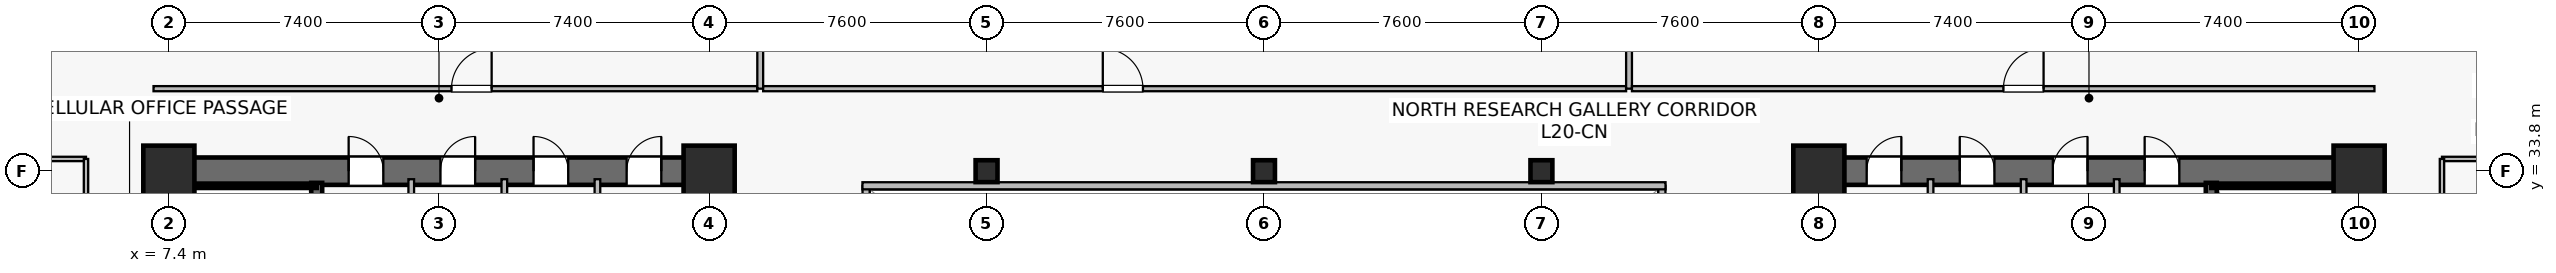
"""IFC4 building model, lengths in metres.
Left out: names, types, materials, properties, quantities, classifications, styles, units other than length and angle.
Written with IfcOpenShell. Run it as: python <this file> out.ifc"""

import sys

from ifc_helpers import new_model, si_unit, direction, frame, frame_2d, origin, origin_2d, place, context, subcontext, project, spatial, rectangle, hollow_rectangle, extrude, source, transform, mapped, element, fill, save


model = new_model("IFC4")
c1 = context("Model", 3, precision=1e-05, world=origin(), true_north=direction((0.0, 1.0)))
c2 = subcontext(c1, "Body", "Model", "MODEL_VIEW")
j1 = project(units=[si_unit("LENGTHUNIT", "METRE"), si_unit("PLANEANGLEUNIT", "RADIAN")], contexts=[c1])
p1 = place(None, origin())
s1 = spatial("IfcSite", under=j1, at=p1, CompositionType="ELEMENT")
p2 = place(p1, origin())
s2 = spatial("IfcBuilding", under=s1, at=p2, CompositionType="ELEMENT")
p3 = place(p2, frame((0.0, 0.0, 82.6)))
s3 = spatial("IfcBuildingStorey", under=s2, at=p3, CompositionType="ELEMENT", Elevation=82.6)
p4 = place(p3, frame((7.025, 33.8, 0.0), z_axis=(0.0, 0.0, 1.0), x_axis=(1.0, 0.0, 0.0)))
e1 = element("IfcWall", 1, at=p4, inside=s3, PredefinedType="SHEAR", context=c2, shape_type="SweptSolid", body=[
    extrude(rectangle(XDim=15.55, YDim=0.75, at=frame_2d((7.775, 0.0))), origin(), (0.0, 0.0, 1.0), 3.78),
])
p5 = place(p4, frame((5.3, 0.0, 0.0)))
e2 = element("IfcOpeningElement", 2, at=p5, cuts=e1, PredefinedType="OPENING", context=c2, shape_type="SweptSolid", body=[
    extrude(rectangle(XDim=0.95, YDim=2.15, at=frame_2d((0.475, 1.075))), frame((0.0, 0.385, 0.0), z_axis=(0.0, -1.0, 0.0), x_axis=(1.0, 0.0, 0.0)), (0.0, 0.0, 1.0), 0.77),
])
p6 = place(p4, frame((7.815, 0.0, 0.0)))
e3 = element("IfcOpeningElement", 3, at=p6, cuts=e1, PredefinedType="OPENING", context=c2, shape_type="SweptSolid", body=[
    extrude(rectangle(XDim=0.95, YDim=2.15, at=frame_2d((0.475, 1.075))), frame((0.0, 0.385, 0.0), z_axis=(0.0, -1.0, 0.0), x_axis=(1.0, 0.0, 0.0)), (0.0, 0.0, 1.0), 0.77),
])
p7 = place(p4, frame((10.365, 0.0, 0.0)))
e4 = element("IfcOpeningElement", 4, at=p7, cuts=e1, PredefinedType="OPENING", context=c2, shape_type="SweptSolid", body=[
    extrude(rectangle(XDim=0.95, YDim=2.15, at=frame_2d((0.475, 1.075))), frame((0.0, 0.385, 0.0), z_axis=(0.0, -1.0, 0.0), x_axis=(1.0, 0.0, 0.0)), (0.0, 0.0, 1.0), 0.77),
])
p8 = place(p4, frame((12.915, 0.0, 0.0)))
e5 = element("IfcOpeningElement", 5, at=p8, cuts=e1, PredefinedType="OPENING", context=c2, shape_type="SweptSolid", body=[
    extrude(rectangle(XDim=0.95, YDim=2.15, at=frame_2d((0.475, 1.075))), frame((0.0, 0.385, 0.0), z_axis=(0.0, -1.0, 0.0), x_axis=(1.0, 0.0, 0.0)), (0.0, 0.0, 1.0), 0.77),
])
p9 = place(p3, frame((7.4, 15.175, 0.0), z_axis=(0.0, 0.0, 1.0), x_axis=(0.0, 1.0, 0.0)))
e6 = element("IfcWall", 6, at=p9, inside=s3, PredefinedType="SHEAR", context=c2, shape_type="SweptSolid", body=[
    extrude(rectangle(XDim=18.25, YDim=0.75, at=frame_2d((9.125, 0.0))), origin(), (0.0, 0.0, 1.0), 3.78),
])
p10 = place(p3, frame((22.2, 15.175, 0.0), z_axis=(0.0, 0.0, 1.0), x_axis=(0.0, 1.0, 0.0)))
e7 = element("IfcWall", 7, at=p10, inside=s3, PredefinedType="SHEAR", context=c2, shape_type="SweptSolid", body=[
    extrude(rectangle(XDim=18.25, YDim=0.75, at=frame_2d((9.125, 0.0))), origin(), (0.0, 0.0, 1.0), 3.78),
])
p11 = place(p10, frame((3.375, 0.0, 0.0)))
e8 = element("IfcOpeningElement", 8, at=p11, cuts=e7, PredefinedType="OPENING", context=c2, shape_type="SweptSolid", body=[
    extrude(rectangle(XDim=1.42, YDim=2.2, at=frame_2d((0.71, 1.1))), frame((0.0, 0.385, 0.0), z_axis=(0.0, -1.0, 0.0), x_axis=(1.0, 0.0, 0.0)), (0.0, 0.0, 1.0), 0.77),
])
p12 = place(p3, frame((11.45, 24.85, 0.0), z_axis=(0.0, 0.0, 1.0), x_axis=(0.0, 1.0, 0.0)))
e9 = element("IfcWall", 9, at=p12, inside=s3, PredefinedType="SHEAR", context=c2, shape_type="SweptSolid", body=[
    extrude(rectangle(XDim=8.63, YDim=0.3, at=frame_2d((4.315, 0.0))), origin(), (0.0, 0.0, 1.0), 3.78),
])
p13 = place(p12, frame((0.42, 0.0, 0.0)))
e10 = element("IfcOpeningElement", 10, at=p13, cuts=e9, PredefinedType="OPENING", context=c2, shape_type="SweptSolid", body=[
    extrude(rectangle(XDim=1.1, YDim=2.15, at=frame_2d((0.55, 1.075))), frame((0.0, 0.16, 0.0), z_axis=(0.0, -1.0, 0.0), x_axis=(1.0, 0.0, 0.0)), (0.0, 0.0, 1.0), 0.32),
])
p14 = place(p3, frame((7.73, 33.4, 0.0), z_axis=(0.0, 0.0, 1.0), x_axis=(1.0, 0.0, 0.0)))
e11 = element("IfcWall", 11, at=p14, inside=s3, PredefinedType="SOLIDWALL", context=c2, shape_type="SweptSolid", body=[
    extrude(rectangle(XDim=3.72, YDim=0.12, at=frame_2d((1.86, 0.0))), origin(), (0.0, 0.0, 1.0), 3.78),
])
p15 = place(p3, frame((52.225, 33.8, 0.0), z_axis=(0.0, 0.0, 1.0), x_axis=(1.0, 0.0, 0.0)))
e12 = element("IfcWall", 12, at=p15, inside=s3, PredefinedType="SHEAR", context=c2, shape_type="SweptSolid", body=[
    extrude(rectangle(XDim=15.55, YDim=0.75, at=frame_2d((7.775, 0.0))), origin(), (0.0, 0.0, 1.0), 3.78),
])
p16 = place(p15, frame((9.3, 0.0, 0.0)))
e13 = element("IfcOpeningElement", 13, at=p16, cuts=e12, PredefinedType="OPENING", context=c2, shape_type="SweptSolid", body=[
    extrude(rectangle(XDim=0.95, YDim=2.15, at=frame_2d((0.475, 1.075))), frame((0.0, 0.385, 0.0), z_axis=(0.0, -1.0, 0.0), x_axis=(1.0, 0.0, 0.0)), (0.0, 0.0, 1.0), 0.77),
])
p17 = place(p15, frame((6.785, 0.0, 0.0)))
e14 = element("IfcOpeningElement", 14, at=p17, cuts=e12, PredefinedType="OPENING", context=c2, shape_type="SweptSolid", body=[
    extrude(rectangle(XDim=0.95, YDim=2.15, at=frame_2d((0.475, 1.075))), frame((0.0, 0.385, 0.0), z_axis=(0.0, -1.0, 0.0), x_axis=(1.0, 0.0, 0.0)), (0.0, 0.0, 1.0), 0.77),
])
p18 = place(p15, frame((4.235, 0.0, 0.0)))
e15 = element("IfcOpeningElement", 15, at=p18, cuts=e12, PredefinedType="OPENING", context=c2, shape_type="SweptSolid", body=[
    extrude(rectangle(XDim=0.95, YDim=2.15, at=frame_2d((0.475, 1.075))), frame((0.0, 0.385, 0.0), z_axis=(0.0, -1.0, 0.0), x_axis=(1.0, 0.0, 0.0)), (0.0, 0.0, 1.0), 0.77),
])
p19 = place(p15, frame((1.685, 0.0, 0.0)))
e16 = element("IfcOpeningElement", 16, at=p19, cuts=e12, PredefinedType="OPENING", context=c2, shape_type="SweptSolid", body=[
    extrude(rectangle(XDim=0.95, YDim=2.15, at=frame_2d((0.475, 1.075))), frame((0.0, 0.385, 0.0), z_axis=(0.0, -1.0, 0.0), x_axis=(1.0, 0.0, 0.0)), (0.0, 0.0, 1.0), 0.77),
])
p20 = place(p3, frame((52.6, 15.175, 0.0), z_axis=(0.0, 0.0, 1.0), x_axis=(0.0, 1.0, 0.0)))
e17 = element("IfcWall", 17, at=p20, inside=s3, PredefinedType="SHEAR", context=c2, shape_type="SweptSolid", body=[
    extrude(rectangle(XDim=18.25, YDim=0.75, at=frame_2d((9.125, 0.0))), origin(), (0.0, 0.0, 1.0), 3.78),
])
p21 = place(p20, frame((3.375, 0.0, 0.0)))
e18 = element("IfcOpeningElement", 18, at=p21, cuts=e17, PredefinedType="OPENING", context=c2, shape_type="SweptSolid", body=[
    extrude(rectangle(XDim=1.42, YDim=2.2, at=frame_2d((0.71, 1.1))), frame((0.0, 0.385, 0.0), z_axis=(0.0, -1.0, 0.0), x_axis=(1.0, 0.0, 0.0)), (0.0, 0.0, 1.0), 0.77),
])
p22 = place(p3, frame((67.4, 15.175, 0.0), z_axis=(0.0, 0.0, 1.0), x_axis=(0.0, 1.0, 0.0)))
e19 = element("IfcWall", 19, at=p22, inside=s3, PredefinedType="SHEAR", context=c2, shape_type="SweptSolid", body=[
    extrude(rectangle(XDim=18.25, YDim=0.75, at=frame_2d((9.125, 0.0))), origin(), (0.0, 0.0, 1.0), 3.78),
])
p23 = place(p3, frame((63.35, 24.85, 0.0), z_axis=(0.0, 0.0, 1.0), x_axis=(0.0, 1.0, 0.0)))
e20 = element("IfcWall", 20, at=p23, inside=s3, PredefinedType="SHEAR", context=c2, shape_type="SweptSolid", body=[
    extrude(rectangle(XDim=8.63, YDim=0.3, at=frame_2d((4.315, 0.0))), origin(), (0.0, 0.0, 1.0), 3.78),
])
p24 = place(p23, frame((0.42, 0.0, 0.0)))
e21 = element("IfcOpeningElement", 21, at=p24, cuts=e20, PredefinedType="OPENING", context=c2, shape_type="SweptSolid", body=[
    extrude(rectangle(XDim=1.1, YDim=2.15, at=frame_2d((0.55, 1.075))), frame((0.0, 0.16, 0.0), z_axis=(0.0, -1.0, 0.0), x_axis=(1.0, 0.0, 0.0)), (0.0, 0.0, 1.0), 0.32),
])
p25 = place(p3, frame((63.35, 33.4, 0.0), z_axis=(0.0, 0.0, 1.0), x_axis=(1.0, 0.0, 0.0)))
e22 = element("IfcWall", 22, at=p25, inside=s3, PredefinedType="SOLIDWALL", context=c2, shape_type="SweptSolid", body=[
    extrude(rectangle(XDim=3.72, YDim=0.12, at=frame_2d((1.86, 0.0))), origin(), (0.0, 0.0, 1.0), 3.78),
])
m1 = source(origin(), c2, "Body", "SweptSolid", [
    extrude(rectangle(XDim=1.4, YDim=1.4, at=origin_2d()), origin(), (0.0, 0.0, 1.0), 4.1),
])
for number, where, z_axis, x_axis in (
    (23, (7.4, 33.8, 0.0), (0.0, 0.0, 1.0), (1.0, 0.0, 0.0)),
    (24, (22.2, 33.8, 0.0), (0.0, 0.0, 1.0), (1.0, 0.0, 0.0)),
    (25, (52.6, 33.8, 0.0), (0.0, 0.0, 1.0), (1.0, 0.0, 0.0)),
    (26, (67.4, 33.8, 0.0), (0.0, 0.0, 1.0), (1.0, 0.0, 0.0)),
):
    element("IfcColumn", number, at=place(p3, frame(where, z_axis=z_axis, x_axis=x_axis)), inside=s3, PredefinedType="COLUMN", context=c2, shape_type="MappedRepresentation", body=[
        mapped(m1, transform((0.0, 0.0, 0.0), scale=1.0)),
    ])
m2 = source(origin(), c2, "Body", "SweptSolid", [
    extrude(hollow_rectangle(XDim=0.6, YDim=0.6, WallThickness=0.028, at=origin_2d()), origin(), (0.0, 0.0, 1.0), 4.1),
])
for number, where, z_axis, x_axis in (
    (27, (29.8, 33.8, 0.0), (0.0, 0.0, 1.0), (1.0, 0.0, 0.0)),
    (28, (37.4, 33.8, 0.0), (0.0, 0.0, 1.0), (1.0, 0.0, 0.0)),
    (29, (45.0, 33.8, 0.0), (0.0, 0.0, 1.0), (1.0, 0.0, 0.0)),
):
    element("IfcColumn", number, at=place(p3, frame(where, z_axis=z_axis, x_axis=x_axis)), inside=s3, PredefinedType="COLUMN", context=c2, shape_type="MappedRepresentation", body=[
        mapped(m2, transform((0.0, 0.0, 0.0), scale=1.0)),
    ])
for number, where, z_axis, x_axis in (
    (30, (14.04, 29.65, 0.0), (0.0, 0.0, 1.0), (0.0, 1.0, 0.0)),
    (31, (16.59, 29.65, 0.0), (0.0, 0.0, 1.0), (0.0, 1.0, 0.0)),
    (32, (19.14, 29.65, 0.0), (0.0, 0.0, 1.0), (0.0, 1.0, 0.0)),
    (33, (60.76, 29.65, 0.0), (0.0, 0.0, 1.0), (0.0, 1.0, 0.0)),
    (34, (58.21, 29.65, 0.0), (0.0, 0.0, 1.0), (0.0, 1.0, 0.0)),
    (35, (55.66, 29.65, 0.0), (0.0, 0.0, 1.0), (0.0, 1.0, 0.0)),
):
    element("IfcWall", number, at=place(p3, frame(where, z_axis=z_axis, x_axis=x_axis)), inside=s3, PredefinedType="PLUMBINGWALL", context=c2, shape_type="SweptSolid", body=[
        extrude(rectangle(XDim=3.93, YDim=0.155, at=frame_2d((1.965, 0.0))), origin(), (0.0, 0.0, 1.0), 3.78),
    ])
p26 = place(p3, frame((26.5, 15.2, 0.0), z_axis=(0.0, 0.0, 1.0), x_axis=(0.0, 1.0, 0.0)))
e36 = element("IfcWall", 36, at=p26, inside=s3, PredefinedType="SOLIDWALL", context=c2, shape_type="SweptSolid", body=[
    extrude(rectangle(XDim=18.2, YDim=0.195, at=frame_2d((9.1, 0.0))), origin(), (0.0, 0.0, 1.0), 3.78),
])
p27 = place(p26, frame((1.8, 0.0, 0.9)))
e37 = element("IfcOpeningElement", 37, at=p27, cuts=e36, PredefinedType="OPENING", context=c2, shape_type="SweptSolid", body=[
    extrude(rectangle(XDim=1.5, YDim=1.4, at=frame_2d((0.75, 0.7))), frame((0.0, 0.107, 0.0), z_axis=(0.0, -1.0, 0.0), x_axis=(1.0, 0.0, 0.0)), (0.0, 0.0, 1.0), 0.215),
])
p28 = place(p26, frame((13.2, 0.0, 0.9)))
e38 = element("IfcOpeningElement", 38, at=p28, cuts=e36, PredefinedType="OPENING", context=c2, shape_type="SweptSolid", body=[
    extrude(rectangle(XDim=1.5, YDim=1.4, at=frame_2d((0.75, 0.7))), frame((0.0, 0.107, 0.0), z_axis=(0.0, -1.0, 0.0), x_axis=(1.0, 0.0, 0.0)), (0.0, 0.0, 1.0), 0.215),
])
p29 = place(p3, frame((48.3, 15.2, 0.0), z_axis=(0.0, 0.0, 1.0), x_axis=(0.0, 1.0, 0.0)))
e39 = element("IfcWall", 39, at=p29, inside=s3, PredefinedType="SOLIDWALL", context=c2, shape_type="SweptSolid", body=[
    extrude(rectangle(XDim=18.2, YDim=0.195, at=frame_2d((9.1, 0.0))), origin(), (0.0, 0.0, 1.0), 3.78),
])
p30 = place(p29, frame((1.8, 0.0, 0.9)))
e40 = element("IfcOpeningElement", 40, at=p30, cuts=e39, PredefinedType="OPENING", context=c2, shape_type="SweptSolid", body=[
    extrude(rectangle(XDim=1.5, YDim=1.4, at=frame_2d((0.75, 0.7))), frame((0.0, 0.107, 0.0), z_axis=(0.0, -1.0, 0.0), x_axis=(1.0, 0.0, 0.0)), (0.0, 0.0, 1.0), 0.215),
])
p31 = place(p29, frame((13.2, 0.0, 0.9)))
e41 = element("IfcOpeningElement", 41, at=p31, cuts=e39, PredefinedType="OPENING", context=c2, shape_type="SweptSolid", body=[
    extrude(rectangle(XDim=1.5, YDim=1.4, at=frame_2d((0.75, 0.7))), frame((0.0, 0.107, 0.0), z_axis=(0.0, -1.0, 0.0), x_axis=(1.0, 0.0, 0.0)), (0.0, 0.0, 1.0), 0.215),
])
p32 = place(p3, frame((26.4, 33.4, 0.0), z_axis=(0.0, 0.0, 1.0), x_axis=(1.0, 0.0, 0.0)))
e42 = element("IfcWall", 42, at=p32, inside=s3, PredefinedType="SOLIDWALL", context=c2, shape_type="SweptSolid", body=[
    extrude(rectangle(XDim=22.0, YDim=0.195, at=frame_2d((11.0, 0.0))), origin(), (0.0, 0.0, 1.0), 3.78),
])
p33 = place(p3, frame((6.98, 36.06, 0.0), z_axis=(0.0, 0.0, 1.0), x_axis=(1.0, 0.0, 0.0)))
e43 = element("IfcWall", 43, at=p33, inside=s3, PredefinedType="PARTITIONING", context=c2, shape_type="SweptSolid", body=[
    extrude(rectangle(XDim=16.54, YDim=0.14, at=frame_2d((8.27, 0.0))), origin(), (0.0, 0.0, 1.0), 3.115),
])
p34 = place(p33, frame((8.162, 0.0, 0.0)))
e44 = element("IfcOpeningElement", 44, at=p34, cuts=e43, PredefinedType="OPENING", context=c2, shape_type="SweptSolid", body=[
    extrude(rectangle(XDim=1.1, YDim=2.18, at=frame_2d((0.55, 1.09))), frame((0.0, 0.08, 0.0), z_axis=(0.0, -1.0, 0.0), x_axis=(1.0, 0.0, 0.0)), (0.0, 0.0, 1.0), 0.16),
])
p35 = place(p3, frame((23.6, 36.06, 0.0), z_axis=(0.0, 0.0, 1.0), x_axis=(0.0, 1.0, 0.0)))
e45 = element("IfcWall", 45, at=p35, inside=s3, PredefinedType="PARTITIONING", context=c2, shape_type="SweptSolid", body=[
    extrude(rectangle(XDim=12.43, YDim=0.16, at=frame_2d((6.215, 0.0))), origin(), (0.0, 0.0, 1.0), 3.015),
])
p36 = place(p3, frame((23.68, 36.06, 0.0), z_axis=(0.0, 0.0, 1.0), x_axis=(1.0, 0.0, 0.0)))
e46 = element("IfcWall", 46, at=p36, inside=s3, PredefinedType="PARTITIONING", context=c2, shape_type="SweptSolid", body=[
    extrude(rectangle(XDim=23.64, YDim=0.14, at=frame_2d((11.82, 0.0))), origin(), (0.0, 0.0, 1.0), 3.115),
])
p37 = place(p36, frame((9.304, 0.0, 0.0)))
e47 = element("IfcOpeningElement", 47, at=p37, cuts=e46, PredefinedType="OPENING", context=c2, shape_type="SweptSolid", body=[
    extrude(rectangle(XDim=1.1, YDim=2.18, at=frame_2d((0.55, 1.09))), frame((0.0, 0.08, 0.0), z_axis=(0.0, -1.0, 0.0), x_axis=(1.0, 0.0, 0.0)), (0.0, 0.0, 1.0), 0.16),
])
p38 = place(p3, frame((47.4, 36.06, 0.0), z_axis=(0.0, 0.0, 1.0), x_axis=(0.0, 1.0, 0.0)))
e48 = element("IfcWall", 48, at=p38, inside=s3, PredefinedType="PARTITIONING", context=c2, shape_type="SweptSolid", body=[
    extrude(rectangle(XDim=11.23, YDim=0.16, at=frame_2d((5.615, 0.0))), origin(), (0.0, 0.0, 1.0), 3.015),
])
p39 = place(p3, frame((47.48, 36.06, 0.0), z_axis=(0.0, 0.0, 1.0), x_axis=(1.0, 0.0, 0.0)))
e49 = element("IfcWall", 49, at=p39, inside=s3, PredefinedType="PARTITIONING", context=c2, shape_type="SweptSolid", body=[
    extrude(rectangle(XDim=20.34, YDim=0.14, at=frame_2d((10.17, 0.0))), origin(), (0.0, 0.0, 1.0), 3.115),
])
p40 = place(p39, frame((10.176, 0.0, 0.0)))
e50 = element("IfcOpeningElement", 50, at=p40, cuts=e49, PredefinedType="OPENING", context=c2, shape_type="SweptSolid", body=[
    extrude(rectangle(XDim=1.1, YDim=2.18, at=frame_2d((0.55, 1.09))), frame((0.0, 0.08, 0.0), z_axis=(0.0, -1.0, 0.0), x_axis=(1.0, 0.0, 0.0)), (0.0, 0.0, 1.0), 0.16),
])
p41 = place(p3, frame((0.11, 34.135, 0.0), z_axis=(0.0, 0.0, 1.0), x_axis=(1.0, 0.0, 0.0)))
e51 = element("IfcWall", 51, at=p41, inside=s3, PredefinedType="PARTITIONING", context=c2, shape_type="SweptSolid", body=[
    extrude(rectangle(XDim=5.02, YDim=0.12, at=frame_2d((2.51, 0.0))), origin(), (0.0, 0.0, 1.0), 3.78),
])
p42 = place(p3, frame((5.13, 23.86, 0.0), z_axis=(0.0, 0.0, 1.0), x_axis=(0.0, 1.0, 0.0)))
e52 = element("IfcWall", 52, at=p42, inside=s3, PredefinedType="PARTITIONING", context=c2, shape_type="SweptSolid", body=[
    extrude(rectangle(XDim=10.275, YDim=0.12, at=frame_2d((5.137, 0.0))), origin(), (0.0, 0.0, 1.0), 3.78),
])
p43 = place(p42, frame((4.688, 0.0, 0.0)))
e53 = element("IfcOpeningElement", 53, at=p43, cuts=e52, PredefinedType="OPENING", context=c2, shape_type="SweptSolid", body=[
    extrude(rectangle(XDim=0.9, YDim=2.1, at=frame_2d((0.45, 1.05))), frame((0.0, 0.07, 0.0), z_axis=(0.0, -1.0, 0.0), x_axis=(1.0, 0.0, 0.0)), (0.0, 0.0, 1.0), 0.14),
])
p44 = place(p3, frame((69.67, 34.135, 0.0), z_axis=(0.0, 0.0, 1.0), x_axis=(1.0, 0.0, 0.0)))
e54 = element("IfcWall", 54, at=p44, inside=s3, PredefinedType="PARTITIONING", context=c2, shape_type="SweptSolid", body=[
    extrude(rectangle(XDim=5.02, YDim=0.12, at=frame_2d((2.51, 0.0))), origin(), (0.0, 0.0, 1.0), 3.78),
])
p45 = place(p3, frame((69.67, 27.86, 0.0), z_axis=(0.0, 0.0, 1.0), x_axis=(0.0, 1.0, 0.0)))
e55 = element("IfcWall", 55, at=p45, inside=s3, PredefinedType="PARTITIONING", context=c2, shape_type="SweptSolid", body=[
    extrude(rectangle(XDim=6.275, YDim=0.12, at=frame_2d((3.137, 0.0))), origin(), (0.0, 0.0, 1.0), 3.78),
])
p46 = place(p45, frame((2.688, 0.0, 0.0)))
e56 = element("IfcOpeningElement", 56, at=p46, cuts=e55, PredefinedType="OPENING", context=c2, shape_type="SweptSolid", body=[
    extrude(rectangle(XDim=0.9, YDim=2.1, at=frame_2d((0.45, 1.05))), frame((0.0, 0.07, 0.0), z_axis=(0.0, -1.0, 0.0), x_axis=(1.0, 0.0, 0.0)), (0.0, 0.0, 1.0), 0.14),
])
m3 = source(origin(), c2, "Body", "SweptSolid", [
    extrude(rectangle(XDim=0.95, YDim=2.15, at=frame_2d((0.475, 1.075))), frame((0.0, 0.025, 0.0), z_axis=(0.0, -1.0, 0.0), x_axis=(1.0, 0.0, 0.0)), (0.0, 0.0, 1.0), 0.05),
])
p47 = place(p5, origin())
e57 = element("IfcDoor", 57, at=p47, inside=s3, OperationType="SINGLE_SWING_LEFT", PredefinedType="DOOR", context=c2, shape_type="MappedRepresentation", body=[
    mapped(m3, transform((0.0, 0.0, 0.0), scale=1.0)),
])
fill(e2, e57)
p48 = place(p6, origin())
e58 = element("IfcDoor", 58, at=p48, inside=s3, OperationType="SINGLE_SWING_RIGHT", PredefinedType="DOOR", context=c2, shape_type="MappedRepresentation", body=[
    mapped(m3, transform((0.0, 0.0, 0.0), scale=1.0)),
])
fill(e3, e58)
p49 = place(p7, origin())
e59 = element("IfcDoor", 59, at=p49, inside=s3, OperationType="SINGLE_SWING_LEFT", PredefinedType="DOOR", context=c2, shape_type="MappedRepresentation", body=[
    mapped(m3, transform((0.0, 0.0, 0.0), scale=1.0)),
])
fill(e4, e59)
p50 = place(p8, origin())
e60 = element("IfcDoor", 60, at=p50, inside=s3, OperationType="SINGLE_SWING_RIGHT", PredefinedType="DOOR", context=c2, shape_type="MappedRepresentation", body=[
    mapped(m3, transform((0.0, 0.0, 0.0), scale=1.0)),
])
fill(e5, e60)
p51 = place(p16, origin())
e61 = element("IfcDoor", 61, at=p51, inside=s3, OperationType="SINGLE_SWING_LEFT", PredefinedType="DOOR", context=c2, shape_type="MappedRepresentation", body=[
    mapped(m3, transform((0.0, 0.0, 0.0), scale=1.0)),
])
fill(e13, e61)
p52 = place(p17, origin())
e62 = element("IfcDoor", 62, at=p52, inside=s3, OperationType="SINGLE_SWING_RIGHT", PredefinedType="DOOR", context=c2, shape_type="MappedRepresentation", body=[
    mapped(m3, transform((0.0, 0.0, 0.0), scale=1.0)),
])
fill(e14, e62)
p53 = place(p18, origin())
e63 = element("IfcDoor", 63, at=p53, inside=s3, OperationType="SINGLE_SWING_LEFT", PredefinedType="DOOR", context=c2, shape_type="MappedRepresentation", body=[
    mapped(m3, transform((0.0, 0.0, 0.0), scale=1.0)),
])
fill(e15, e63)
p54 = place(p19, origin())
e64 = element("IfcDoor", 64, at=p54, inside=s3, OperationType="SINGLE_SWING_RIGHT", PredefinedType="DOOR", context=c2, shape_type="MappedRepresentation", body=[
    mapped(m3, transform((0.0, 0.0, 0.0), scale=1.0)),
])
fill(e16, e64)
m4 = source(origin(), c2, "Body", "SweptSolid", [
    extrude(rectangle(XDim=1.1, YDim=2.18, at=frame_2d((0.55, 1.09))), frame((0.0, 0.025, 0.0), z_axis=(0.0, -1.0, 0.0), x_axis=(1.0, 0.0, 0.0)), (0.0, 0.0, 1.0), 0.05),
])
p55 = place(p34, origin())
e65 = element("IfcDoor", 65, at=p55, inside=s3, OperationType="SINGLE_SWING_RIGHT", PredefinedType="DOOR", context=c2, shape_type="MappedRepresentation", body=[
    mapped(m4, transform((0.0, 0.0, 0.0), scale=1.0)),
])
fill(e44, e65)
p56 = place(p37, origin())
e66 = element("IfcDoor", 66, at=p56, inside=s3, OperationType="SINGLE_SWING_LEFT", PredefinedType="DOOR", context=c2, shape_type="MappedRepresentation", body=[
    mapped(m4, transform((0.0, 0.0, 0.0), scale=1.0)),
])
fill(e47, e66)
p57 = place(p40, origin())
e67 = element("IfcDoor", 67, at=p57, inside=s3, OperationType="SINGLE_SWING_RIGHT", PredefinedType="DOOR", context=c2, shape_type="MappedRepresentation", body=[
    mapped(m4, transform((0.0, 0.0, 0.0), scale=1.0)),
])
fill(e50, e67)
save(model, sys.argv[1])
